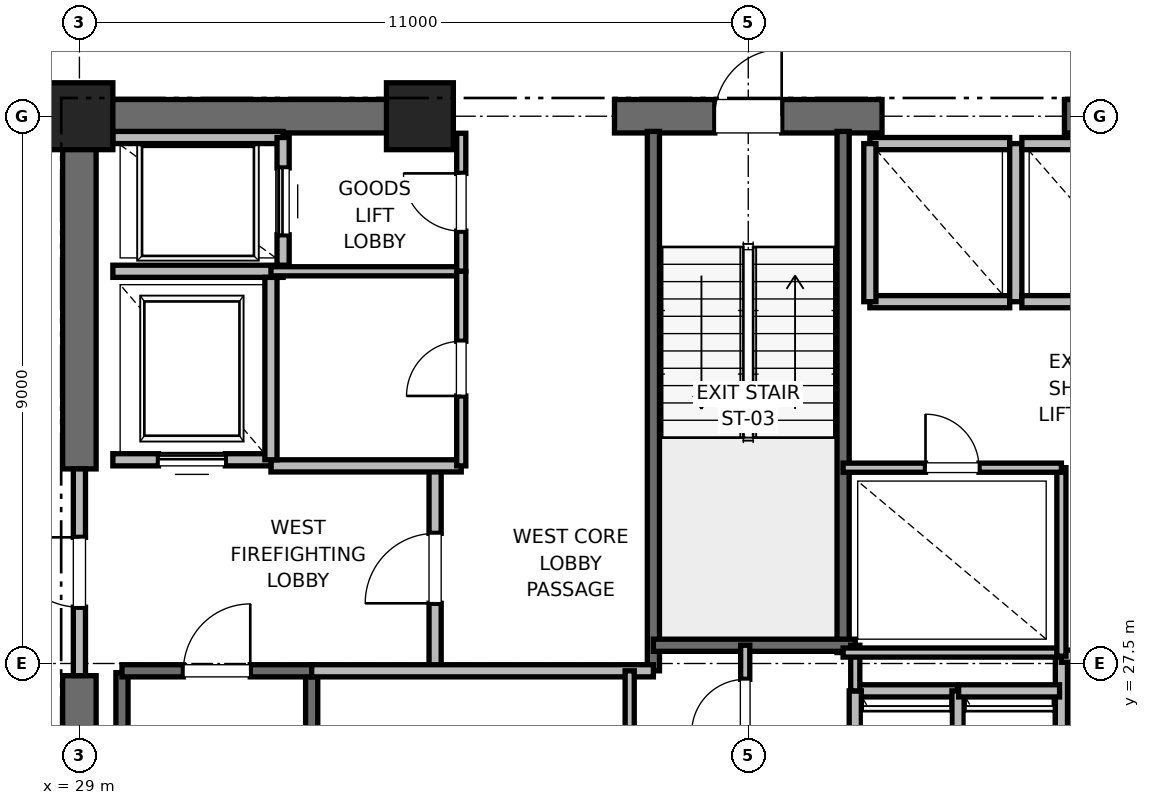
"""IFC4 building model, lengths in metres.
Left out: names, types, materials, properties, quantities, classifications, styles, units other than length and angle.
Written with IfcOpenShell. Run it as: python <this file> out.ifc"""

import sys

from ifc_helpers import new_model, si_unit, direction, frame, frame_2d, origin, origin_2d, place, context, subcontext, project, spatial, rectangle, extrude, element, fill, save


model = new_model("IFC4")
c1 = context("Model", 3, precision=1e-05, world=origin(), true_north=direction((0.0, 1.0)))
c2 = subcontext(c1, "Body", "Model", "MODEL_VIEW")
j1 = project(units=[si_unit("LENGTHUNIT", "METRE"), si_unit("PLANEANGLEUNIT", "RADIAN")], contexts=[c1])
p1 = place(None, origin())
s1 = spatial("IfcSite", under=j1, at=p1, CompositionType="ELEMENT")
p2 = place(p1, origin())
s2 = spatial("IfcBuilding", under=s1, at=p2, CompositionType="ELEMENT")
p3 = place(p2, frame((0.0, 0.0, 152.4)))
s3 = spatial("IfcBuildingStorey", under=s2, at=p3, CompositionType="ELEMENT", Elevation=152.4)
for number, where, z_axis, x_axis in (
    (1, (29.0, 36.5, 0.0), (0.0, 0.0, 1.0), (1.0, 0.0, 0.0)),
    (2, (34.6, 36.5, 0.0), (0.0, 0.0, 1.0), (1.0, 0.0, 0.0)),
):
    element("IfcColumn", number, at=place(p3, frame(where, z_axis=z_axis, x_axis=x_axis)), inside=s3, PredefinedType="PILASTER", context=c2, shape_type="SweptSolid", body=[
        extrude(rectangle(XDim=1.1, YDim=1.1, at=origin_2d()), origin(), (0.0, 0.0, 1.0), 4.0),
    ])
p4 = place(p3, frame((29.0, 36.5, 0.0), z_axis=(0.0, 0.0, 1.0), x_axis=(1.0, 0.0, 0.0)))
e3 = element("IfcWall", 3, at=p4, inside=s3, PredefinedType="SHEAR", context=c2, shape_type="SweptSolid", body=[
    extrude(rectangle(XDim=5.8, YDim=0.55, at=frame_2d((2.9, 0.0))), origin(), (0.0, 0.0, 1.0), 3.775),
])
p5 = place(p3, frame((37.8, 36.5, 0.0), z_axis=(0.0, 0.0, 1.0), x_axis=(1.0, 0.0, 0.0)))
e4 = element("IfcWall", 4, at=p5, inside=s3, PredefinedType="SHEAR", context=c2, shape_type="SweptSolid", body=[
    extrude(rectangle(XDim=4.4, YDim=0.55, at=frame_2d((2.2, 0.0))), origin(), (0.0, 0.0, 1.0), 3.775),
])
p6 = place(p5, frame((1.65, 0.0, 0.0)))
e5 = element("IfcOpeningElement", 5, at=p6, cuts=e4, PredefinedType="OPENING", context=c2, shape_type="SweptSolid", body=[
    extrude(rectangle(XDim=1.1, YDim=2.15, at=frame_2d((0.55, 1.075))), frame((0.0, 0.275, 0.0), z_axis=(0.0, -1.0, 0.0), x_axis=(1.0, 0.0, 0.0)), (0.0, 0.0, 1.0), 0.55),
])
p7 = place(p3, frame((45.2, 36.5, 0.0), z_axis=(0.0, 0.0, 1.0), x_axis=(1.0, 0.0, 0.0)))
e6 = element("IfcWall", 6, at=p7, inside=s3, PredefinedType="SHEAR", context=c2, shape_type="SweptSolid", body=[
    extrude(rectangle(XDim=5.8, YDim=0.55, at=frame_2d((2.9, 0.0))), origin(), (0.0, 0.0, 1.0), 3.775),
])
p8 = place(p3, frame((29.0, 18.5, 0.0), z_axis=(0.0, 0.0, 1.0), x_axis=(0.0, 1.0, 0.0)))
e7 = element("IfcWall", 7, at=p8, inside=s3, PredefinedType="SHEAR", context=c2, shape_type="SweptSolid", body=[
    extrude(rectangle(XDim=8.8, YDim=0.55, at=frame_2d((4.4, 0.0))), origin(), (0.0, 0.0, 1.0), 3.775),
])
p9 = place(p3, frame((29.0, 30.7, 0.0), z_axis=(0.0, 0.0, 1.0), x_axis=(0.0, 1.0, 0.0)))
e8 = element("IfcWall", 8, at=p9, inside=s3, PredefinedType="SHEAR", context=c2, shape_type="SweptSolid", body=[
    extrude(rectangle(XDim=5.8, YDim=0.55, at=frame_2d((2.9, 0.0))), origin(), (0.0, 0.0, 1.0), 3.775),
])
p10 = place(p3, frame((29.7, 19.2, 0.0), z_axis=(0.0, 0.0, 1.0), x_axis=(0.0, 1.0, 0.0)))
e9 = element("IfcWall", 9, at=p10, inside=s3, PredefinedType="SOLIDWALL", context=c2, shape_type="SweptSolid", body=[
    extrude(rectangle(XDim=8.15, YDim=0.2, at=frame_2d((4.075, 0.0))), origin(), (0.0, 0.0, 1.0), 3.775),
])
p11 = place(p3, frame((32.82, 18.6, 0.0), z_axis=(0.0, 0.0, 1.0), x_axis=(0.0, 1.0, 0.0)))
e10 = element("IfcWall", 10, at=p11, inside=s3, PredefinedType="SOLIDWALL", context=c2, shape_type="SweptSolid", body=[
    extrude(rectangle(XDim=8.78, YDim=0.2, at=frame_2d((4.39, 0.0))), origin(), (0.0, 0.0, 1.0), 3.775),
])
p12 = place(p3, frame((29.7, 27.38, 0.0), z_axis=(0.0, 0.0, 1.0), x_axis=(1.0, 0.0, 0.0)))
e11 = element("IfcWall", 11, at=p12, inside=s3, PredefinedType="SOLIDWALL", context=c2, shape_type="SweptSolid", body=[
    extrude(rectangle(XDim=3.12, YDim=0.2, at=frame_2d((1.56, 0.0))), origin(), (0.0, 0.0, 1.0), 3.775),
])
p13 = place(p12, frame((1.01, 0.0, 0.0)))
e12 = element("IfcOpeningElement", 12, at=p13, cuts=e11, PredefinedType="OPENING", context=c2, shape_type="SweptSolid", body=[
    extrude(rectangle(XDim=1.1, YDim=2.15, at=frame_2d((0.55, 1.075))), frame((0.0, 0.1, 0.0), z_axis=(0.0, -1.0, 0.0), x_axis=(1.0, 0.0, 0.0)), (0.0, 0.0, 1.0), 0.2),
])
p14 = place(p3, frame((38.44, 27.38, 0.0), z_axis=(0.0, 0.0, 1.0), x_axis=(0.0, 1.0, 0.0)))
e13 = element("IfcWall", 13, at=p14, inside=s3, PredefinedType="SOLIDWALL", context=c2, shape_type="SweptSolid", body=[
    extrude(rectangle(XDim=8.87, YDim=0.2, at=frame_2d((4.435, 0.0))), origin(), (0.0, 0.0, 1.0), 3.775),
])
p15 = place(p3, frame((41.56, 27.68, 0.0), z_axis=(0.0, 0.0, 1.0), x_axis=(0.0, 1.0, 0.0)))
e14 = element("IfcWall", 14, at=p15, inside=s3, PredefinedType="SOLIDWALL", context=c2, shape_type="SweptSolid", body=[
    extrude(rectangle(XDim=8.57, YDim=0.2, at=frame_2d((4.285, 0.0))), origin(), (0.0, 0.0, 1.0), 3.775),
])
p16 = place(p3, frame((38.44, 27.8, 0.0), z_axis=(0.0, 0.0, 1.0), x_axis=(1.0, 0.0, 0.0)))
e15 = element("IfcWall", 15, at=p16, inside=s3, PredefinedType="SOLIDWALL", context=c2, shape_type="SweptSolid", body=[
    extrude(rectangle(XDim=3.32, YDim=0.2, at=frame_2d((1.66, 0.0))), origin(), (0.0, 0.0, 1.0), 3.775),
])
p17 = place(p3, frame((34.85, 27.38, 0.0), z_axis=(0.0, 0.0, 1.0), x_axis=(0.0, 1.0, 0.0)))
e16 = element("IfcWall", 16, at=p17, inside=s3, PredefinedType="PARTITIONING", context=c2, shape_type="SweptSolid", body=[
    extrude(rectangle(XDim=3.37, YDim=0.2, at=frame_2d((1.685, 0.0))), origin(), (0.0, 0.0, 1.0), 3.775),
])
p18 = place(p17, frame((1.11, 0.0, 0.0)))
e17 = element("IfcOpeningElement", 17, at=p18, cuts=e16, PredefinedType="OPENING", context=c2, shape_type="SweptSolid", body=[
    extrude(rectangle(XDim=1.15, YDim=2.2, at=frame_2d((0.575, 1.1))), frame((0.0, 0.1, 0.0), z_axis=(0.0, -1.0, 0.0), x_axis=(1.0, 0.0, 0.0)), (0.0, 0.0, 1.0), 0.2),
])
p19 = place(p3, frame((29.0, 27.3, 0.0), z_axis=(0.0, 0.0, 1.0), x_axis=(0.0, 1.0, 0.0)))
e18 = element("IfcWall", 18, at=p19, inside=s3, PredefinedType="PARTITIONING", context=c2, shape_type="SweptSolid", body=[
    extrude(rectangle(XDim=3.4, YDim=0.2, at=frame_2d((1.7, 0.0))), origin(), (0.0, 0.0, 1.0), 2.755),
])
p20 = place(p19, frame((1.125, 0.0, 0.0)))
e19 = element("IfcOpeningElement", 19, at=p20, cuts=e18, PredefinedType="OPENING", context=c2, shape_type="SweptSolid", body=[
    extrude(rectangle(XDim=1.15, YDim=2.2, at=frame_2d((0.575, 1.1))), frame((0.0, 0.1, 0.0), z_axis=(0.0, -1.0, 0.0), x_axis=(1.0, 0.0, 0.0)), (0.0, 0.0, 1.0), 0.2),
])
p21 = place(p3, frame((32.82, 27.38, 0.0), z_axis=(0.0, 0.0, 1.0), x_axis=(1.0, 0.0, 0.0)))
e20 = element("IfcWall", 20, at=p21, inside=s3, PredefinedType="PARTITIONING", context=c2, shape_type="SweptSolid", body=[
    extrude(rectangle(XDim=5.62, YDim=0.2, at=frame_2d((2.81, 0.0))), origin(), (0.0, 0.0, 1.0), 3.775),
])
p22 = place(p3, frame((32.15, 30.75, 0.0), z_axis=(0.0, 0.0, 1.0), x_axis=(1.0, 0.0, 0.0)))
e21 = element("IfcWall", 21, at=p22, inside=s3, PredefinedType="PARTITIONING", context=c2, shape_type="SweptSolid", body=[
    extrude(rectangle(XDim=3.13, YDim=0.2, at=frame_2d((1.565, 0.0))), origin(), (0.0, 0.0, 1.0), 3.775),
])
p23 = place(p3, frame((45.15, 24.25, 0.0), z_axis=(0.0, 0.0, 1.0), x_axis=(0.0, 1.0, 0.0)))
e22 = element("IfcWall", 22, at=p23, inside=s3, PredefinedType="PARTITIONING", context=c2, shape_type="SweptSolid", body=[
    extrude(rectangle(XDim=3.37, YDim=0.2, at=frame_2d((1.685, 0.0))), origin(), (0.0, 0.0, 1.0), 3.775),
])
p24 = place(p3, frame((45.15, 27.62, 0.0), z_axis=(0.0, 0.0, 1.0), x_axis=(1.0, 0.0, 0.0)))
e23 = element("IfcWall", 23, at=p24, inside=s3, PredefinedType="PARTITIONING", context=c2, shape_type="SweptSolid", body=[
    extrude(rectangle(XDim=2.03, YDim=0.2, at=frame_2d((1.015, 0.0))), origin(), (0.0, 0.0, 1.0), 3.775),
])
p25 = place(p24, frame((0.44, 0.0, 0.0)))
e24 = element("IfcOpeningElement", 24, at=p25, cuts=e23, PredefinedType="OPENING", context=c2, shape_type="SweptSolid", body=[
    extrude(rectangle(XDim=1.15, YDim=2.2, at=frame_2d((0.575, 1.1))), frame((0.0, 0.1, 0.0), z_axis=(0.0, -1.0, 0.0), x_axis=(1.0, 0.0, 0.0)), (0.0, 0.0, 1.0), 0.2),
])
p26 = place(p3, frame((29.55, 30.85, 0.0), z_axis=(0.0, 0.0, 1.0), x_axis=(1.0, 0.0, 0.0)))
e25 = element("IfcWall", 25, at=p26, inside=s3, PredefinedType="SOLIDWALL", context=c2, shape_type="SweptSolid", body=[
    extrude(rectangle(XDim=2.6, YDim=0.2, at=frame_2d((1.3, 0.0))), origin(), (0.0, 0.0, 1.0), 2.755),
])
p27 = place(p26, frame((0.75, 0.0, 0.0)))
e26 = element("IfcOpeningElement", 26, at=p27, cuts=e25, PredefinedType="OPENING", context=c2, shape_type="SweptSolid", body=[
    extrude(rectangle(XDim=1.1, YDim=2.2, at=frame_2d((0.55, 1.1))), frame((0.0, 0.1, 0.0), z_axis=(0.0, -1.0, 0.0), x_axis=(1.0, 0.0, 0.0)), (0.0, 0.0, 1.0), 0.2),
])
p28 = place(p3, frame((29.55, 33.95, 0.0), z_axis=(0.0, 0.0, 1.0), x_axis=(1.0, 0.0, 0.0)))
e27 = element("IfcWall", 27, at=p28, inside=s3, PredefinedType="SOLIDWALL", context=c2, shape_type="SweptSolid", body=[
    extrude(rectangle(XDim=2.8, YDim=0.2, at=frame_2d((1.4, 0.0))), origin(), (0.0, 0.0, 1.0), 3.775),
])
p29 = place(p3, frame((32.15, 30.85, 0.0), z_axis=(0.0, 0.0, 1.0), x_axis=(0.0, 1.0, 0.0)))
e28 = element("IfcWall", 28, at=p29, inside=s3, PredefinedType="SOLIDWALL", context=c2, shape_type="SweptSolid", body=[
    extrude(rectangle(XDim=3.0, YDim=0.2, at=frame_2d((1.5, 0.0))), origin(), (0.0, 0.0, 1.0), 3.775),
])
p30 = place(p3, frame((32.35, 36.15, 0.0), z_axis=(0.0, 0.0, 1.0), x_axis=(-1.0, 0.0, 0.0)))
e29 = element("IfcWall", 29, at=p30, inside=s3, PredefinedType="SOLIDWALL", context=c2, shape_type="SweptSolid", body=[
    extrude(rectangle(XDim=2.8, YDim=0.2, at=frame_2d((1.4, 0.0))), origin(), (0.0, 0.0, 1.0), 2.985),
])
p31 = place(p3, frame((32.35, 34.05, 0.0), z_axis=(0.0, 0.0, 1.0), x_axis=(0.0, 1.0, 0.0)))
e30 = element("IfcWall", 30, at=p31, inside=s3, PredefinedType="SOLIDWALL", context=c2, shape_type="SweptSolid", body=[
    extrude(rectangle(XDim=2.1, YDim=0.2, at=frame_2d((1.05, 0.0))), origin(), (0.0, 0.0, 1.0), 3.775),
])
p32 = place(p31, frame((0.5, 0.0, 0.0)))
e31 = element("IfcOpeningElement", 31, at=p32, cuts=e30, PredefinedType="OPENING", context=c2, shape_type="SweptSolid", body=[
    extrude(rectangle(XDim=1.1, YDim=2.2, at=frame_2d((0.55, 1.1))), frame((0.0, 0.1, 0.0), z_axis=(0.0, -1.0, 0.0), x_axis=(1.0, 0.0, 0.0)), (0.0, 0.0, 1.0), 0.2),
])
p33 = place(p3, frame((43.44, 27.05, 0.0), z_axis=(0.0, 0.0, 1.0), x_axis=(-1.0, 0.0, 0.0)))
e32 = element("IfcWall", 32, at=p33, inside=s3, PredefinedType="SOLIDWALL", context=c2, shape_type="SweptSolid", body=[
    extrude(rectangle(XDim=1.68, YDim=0.2, at=frame_2d((0.84, 0.0))), origin(), (0.0, 0.0, 1.0), 3.775),
])
for number, where, z_axis, x_axis in (
    (33, (41.76, 27.05, 0.0), (0.0, 0.0, 1.0), (0.0, -1.0, 0.0)),
    (34, (43.45, 24.45, 0.0), (0.0, 0.0, 1.0), (0.0, 1.0, 0.0)),
):
    element("IfcWall", number, at=place(p3, frame(where, z_axis=z_axis, x_axis=x_axis)), inside=s3, PredefinedType="SOLIDWALL", context=c2, shape_type="SweptSolid", body=[
        extrude(rectangle(XDim=2.6, YDim=0.2, at=frame_2d((1.3, 0.0))), origin(), (0.0, 0.0, 1.0), 3.775),
    ])
p34 = place(p3, frame((45.12, 27.05, 0.0), z_axis=(0.0, 0.0, 1.0), x_axis=(-1.0, 0.0, 0.0)))
e35 = element("IfcWall", 35, at=p34, inside=s3, PredefinedType="SOLIDWALL", context=c2, shape_type="SweptSolid", body=[
    extrude(rectangle(XDim=1.66, YDim=0.2, at=frame_2d((0.83, 0.0))), origin(), (0.0, 0.0, 1.0), 3.775),
])
p35 = place(p3, frame((42.0, 33.45, 0.0), z_axis=(0.0, 0.0, 1.0), x_axis=(1.0, 0.0, 0.0)))
e36 = element("IfcWall", 36, at=p35, inside=s3, PredefinedType="SOLIDWALL", context=c2, shape_type="SweptSolid", body=[
    extrude(rectangle(XDim=2.3, YDim=0.2, at=frame_2d((1.15, 0.0))), origin(), (0.0, 0.0, 1.0), 3.775),
])
p36 = place(p3, frame((44.3, 36.05, 0.0), z_axis=(0.0, 0.0, 1.0), x_axis=(-1.0, 0.0, 0.0)))
e37 = element("IfcWall", 37, at=p36, inside=s3, PredefinedType="SOLIDWALL", context=c2, shape_type="SweptSolid", body=[
    extrude(rectangle(XDim=2.3, YDim=0.2, at=frame_2d((1.15, 0.0))), origin(), (0.0, 0.0, 1.0), 2.755),
])
for number, where, z_axis, x_axis in (
    (38, (42.0, 36.05, 0.0), (0.0, 0.0, 1.0), (0.0, -1.0, 0.0)),
    (39, (44.4, 33.45, 0.0), (0.0, 0.0, 1.0), (0.0, 1.0, 0.0)),
):
    element("IfcWall", number, at=place(p3, frame(where, z_axis=z_axis, x_axis=x_axis)), inside=s3, PredefinedType="SOLIDWALL", context=c2, shape_type="SweptSolid", body=[
        extrude(rectangle(XDim=2.6, YDim=0.2, at=frame_2d((1.3, 0.0))), origin(), (0.0, 0.0, 1.0), 2.755),
    ])
p37 = place(p3, frame((44.5, 33.45, 0.0), z_axis=(0.0, 0.0, 1.0), x_axis=(1.0, 0.0, 0.0)))
e40 = element("IfcWall", 40, at=p37, inside=s3, PredefinedType="SOLIDWALL", context=c2, shape_type="SweptSolid", body=[
    extrude(rectangle(XDim=2.3, YDim=0.2, at=frame_2d((1.15, 0.0))), origin(), (0.0, 0.0, 1.0), 3.775),
])
p38 = place(p3, frame((46.8, 36.05, 0.0), z_axis=(0.0, 0.0, 1.0), x_axis=(-1.0, 0.0, 0.0)))
e41 = element("IfcWall", 41, at=p38, inside=s3, PredefinedType="SOLIDWALL", context=c2, shape_type="SweptSolid", body=[
    extrude(rectangle(XDim=2.3, YDim=0.2, at=frame_2d((1.15, 0.0))), origin(), (0.0, 0.0, 1.0), 2.755),
])
p39 = place(p3, frame((41.76, 27.05, 0.0), z_axis=(0.0, 0.0, 1.0), x_axis=(0.0, 1.0, 0.0)))
e42 = element("IfcWall", 42, at=p39, inside=s3, PredefinedType="PARTITIONING", context=c2, shape_type="SweptSolid", body=[
    extrude(rectangle(XDim=0.75, YDim=0.15, at=frame_2d((0.375, 0.0))), origin(), (0.0, 0.0, 1.0), 2.85),
])
p40 = place(p3, frame((39.95, 25.8, 0.0), z_axis=(0.0, 0.0, 1.0), x_axis=(0.0, 1.0, 0.0)))
e43 = element("IfcWall", 43, at=p40, inside=s3, PredefinedType="PARTITIONING", context=c2, shape_type="SweptSolid", body=[
    extrude(rectangle(XDim=2.0, YDim=0.15, at=frame_2d((1.0, 0.0))), origin(), (0.0, 0.0, 1.0), 2.85),
])
p41 = place(p40, frame((0.56, 0.0, 0.0)))
e44 = element("IfcOpeningElement", 44, at=p41, cuts=e43, PredefinedType="OPENING", context=c2, shape_type="SweptSolid", body=[
    extrude(rectangle(XDim=0.88, YDim=2.1, at=frame_2d((0.44, 1.05))), frame((0.0, 0.075, 0.0), z_axis=(0.0, -1.0, 0.0), x_axis=(1.0, 0.0, 0.0)), (0.0, 0.0, 1.0), 0.15),
])
p42 = place(p3, frame((32.15, 33.95, 0.0), z_axis=(0.0, 0.0, 1.0), x_axis=(1.0, 0.0, 0.0)))
e45 = element("IfcWall", 45, at=p42, inside=s3, PredefinedType="PARTITIONING", context=c2, shape_type="SweptSolid", body=[
    extrude(rectangle(XDim=3.13, YDim=0.15, at=frame_2d((1.565, 0.0))), origin(), (0.0, 0.0, 1.0), 2.85),
])
p43 = place(p3, frame((35.28, 33.95, 0.0), z_axis=(0.0, 0.0, 1.0), x_axis=(0.0, 1.0, 0.0)))
e46 = element("IfcWall", 46, at=p43, inside=s3, PredefinedType="PARTITIONING", context=c2, shape_type="SweptSolid", body=[
    extrude(rectangle(XDim=2.27, YDim=0.15, at=frame_2d((1.135, 0.0))), origin(), (0.0, 0.0, 1.0), 2.755),
])
p44 = place(p43, frame((0.66, 0.0, 0.0)))
e47 = element("IfcOpeningElement", 47, at=p44, cuts=e46, PredefinedType="OPENING", context=c2, shape_type="SweptSolid", body=[
    extrude(rectangle(XDim=0.95, YDim=2.15, at=frame_2d((0.475, 1.075))), frame((0.0, 0.075, 0.0), z_axis=(0.0, -1.0, 0.0), x_axis=(1.0, 0.0, 0.0)), (0.0, 0.0, 1.0), 0.15),
])
p45 = place(p3, frame((35.28, 30.75, 0.0), z_axis=(0.0, 0.0, 1.0), x_axis=(0.0, 1.0, 0.0)))
e48 = element("IfcWall", 48, at=p45, inside=s3, PredefinedType="PARTITIONING", context=c2, shape_type="SweptSolid", body=[
    extrude(rectangle(XDim=3.2, YDim=0.15, at=frame_2d((1.6, 0.0))), origin(), (0.0, 0.0, 1.0), 2.85),
])
p46 = place(p45, frame((1.15, 0.0, 0.0)))
e49 = element("IfcOpeningElement", 49, at=p46, cuts=e48, PredefinedType="OPENING", context=c2, shape_type="SweptSolid", body=[
    extrude(rectangle(XDim=0.9, YDim=2.1, at=frame_2d((0.45, 1.05))), frame((0.0, 0.075, 0.0), z_axis=(0.0, -1.0, 0.0), x_axis=(1.0, 0.0, 0.0)), (0.0, 0.0, 1.0), 0.15),
])
p47 = place(p3, frame((38.05, 18.6, 0.0), z_axis=(0.0, 0.0, 1.0), x_axis=(0.0, 1.0, 0.0)))
e50 = element("IfcWall", 50, at=p47, inside=s3, PredefinedType="PARTITIONING", context=c2, shape_type="SweptSolid", body=[
    extrude(rectangle(XDim=8.78, YDim=0.15, at=frame_2d((4.39, 0.0))), origin(), (0.0, 0.0, 1.0), 2.755),
])
p48 = place(p47, frame((3.89, 0.0, 0.0)))
e51 = element("IfcOpeningElement", 51, at=p48, cuts=e50, PredefinedType="OPENING", context=c2, shape_type="SweptSolid", body=[
    extrude(rectangle(XDim=1.0, YDim=2.15, at=frame_2d((0.5, 1.075))), frame((0.0, 0.075, 0.0), z_axis=(0.0, -1.0, 0.0), x_axis=(1.0, 0.0, 0.0)), (0.0, 0.0, 1.0), 0.15),
])
p49 = place(p3, frame((41.56, 27.68, 0.0), z_axis=(0.0, 0.0, 1.0), x_axis=(1.0, 0.0, 0.0)))
e52 = element("IfcWall", 52, at=p49, inside=s3, PredefinedType="PARTITIONING", context=c2, shape_type="SweptSolid", body=[
    extrude(rectangle(XDim=3.59, YDim=0.15, at=frame_2d((1.795, 0.0))), origin(), (0.0, 0.0, 1.0), 2.85),
])
p50 = place(p3, frame((45.15, 27.62, 0.0), z_axis=(0.0, 0.0, 1.0), x_axis=(0.0, 1.0, 0.0)))
e53 = element("IfcWall", 53, at=p50, inside=s3, PredefinedType="PARTITIONING", context=c2, shape_type="SweptSolid", body=[
    extrude(rectangle(XDim=3.1, YDim=0.15, at=frame_2d((1.55, 0.0))), origin(), (0.0, 0.0, 1.0), 2.85),
])
p51 = place(p3, frame((41.56, 30.72, 0.0), z_axis=(0.0, 0.0, 1.0), x_axis=(1.0, 0.0, 0.0)))
e54 = element("IfcWall", 54, at=p51, inside=s3, PredefinedType="PARTITIONING", context=c2, shape_type="SweptSolid", body=[
    extrude(rectangle(XDim=3.59, YDim=0.15, at=frame_2d((1.795, 0.0))), origin(), (0.0, 0.0, 1.0), 2.85),
])
p52 = place(p51, frame((1.355, 0.0, 0.0)))
e55 = element("IfcOpeningElement", 55, at=p52, cuts=e54, PredefinedType="OPENING", context=c2, shape_type="SweptSolid", body=[
    extrude(rectangle(XDim=0.88, YDim=2.1, at=frame_2d((0.44, 1.05))), frame((0.0, 0.075, 0.0), z_axis=(0.0, -1.0, 0.0), x_axis=(1.0, 0.0, 0.0)), (0.0, 0.0, 1.0), 0.15),
])
p53 = place(p13, origin())
e56 = element("IfcDoor", 56, at=p53, inside=s3, OperationType="SINGLE_SWING_RIGHT", PredefinedType="DOOR", context=c2, shape_type="SweptSolid", body=[
    extrude(rectangle(XDim=1.1, YDim=2.15, at=frame_2d((0.55, 1.075))), frame((0.0, 0.025, 0.0), z_axis=(0.0, -1.0, 0.0), x_axis=(1.0, 0.0, 0.0)), (0.0, 0.0, 1.0), 0.05),
])
fill(e12, e56)
p54 = place(p6, origin())
e57 = element("IfcDoor", 57, at=p54, inside=s3, OperationType="SINGLE_SWING_RIGHT", PredefinedType="DOOR", context=c2, shape_type="SweptSolid", body=[
    extrude(rectangle(XDim=1.1, YDim=2.15, at=frame_2d((0.55, 1.075))), frame((0.0, 0.025, 0.0), z_axis=(0.0, -1.0, 0.0), x_axis=(1.0, 0.0, 0.0)), (0.0, 0.0, 1.0), 0.05),
])
fill(e5, e57)
p55 = place(p18, origin())
e58 = element("IfcDoor", 58, at=p55, inside=s3, OperationType="SINGLE_SWING_LEFT", PredefinedType="DOOR", context=c2, shape_type="SweptSolid", body=[
    extrude(rectangle(XDim=1.15, YDim=2.2, at=frame_2d((0.575, 1.1))), frame((0.0, 0.025, 0.0), z_axis=(0.0, -1.0, 0.0), x_axis=(1.0, 0.0, 0.0)), (0.0, 0.0, 1.0), 0.05),
])
fill(e17, e58)
p56 = place(p20, origin())
e59 = element("IfcDoor", 59, at=p56, inside=s3, OperationType="SINGLE_SWING_RIGHT", PredefinedType="DOOR", context=c2, shape_type="SweptSolid", body=[
    extrude(rectangle(XDim=1.15, YDim=2.2, at=frame_2d((0.575, 1.1))), frame((0.0, 0.025, 0.0), z_axis=(0.0, -1.0, 0.0), x_axis=(1.0, 0.0, 0.0)), (0.0, 0.0, 1.0), 0.05),
])
fill(e19, e59)
p57 = place(p27, origin())
e60 = element("IfcDoor", 60, at=p57, inside=s3, OperationType="SLIDING_TO_RIGHT", PredefinedType="DOOR", context=c2, shape_type="SweptSolid", body=[
    extrude(rectangle(XDim=1.1, YDim=2.2, at=frame_2d((0.55, 1.1))), frame((0.0, 0.025, 0.0), z_axis=(0.0, -1.0, 0.0), x_axis=(1.0, 0.0, 0.0)), (0.0, 0.0, 1.0), 0.05),
])
fill(e26, e60)
p58 = place(p32, origin())
e61 = element("IfcDoor", 61, at=p58, inside=s3, OperationType="SLIDING_TO_RIGHT", PredefinedType="DOOR", context=c2, shape_type="SweptSolid", body=[
    extrude(rectangle(XDim=1.1, YDim=2.2, at=frame_2d((0.55, 1.1))), frame((0.0, 0.025, 0.0), z_axis=(0.0, -1.0, 0.0), x_axis=(1.0, 0.0, 0.0)), (0.0, 0.0, 1.0), 0.05),
])
fill(e31, e61)
p59 = place(p41, origin())
e62 = element("IfcDoor", 62, at=p59, inside=s3, OperationType="SINGLE_SWING_LEFT", PredefinedType="DOOR", context=c2, shape_type="SweptSolid", body=[
    extrude(rectangle(XDim=0.88, YDim=2.1, at=frame_2d((0.44, 1.05))), frame((0.0, 0.025, 0.0), z_axis=(0.0, -1.0, 0.0), x_axis=(1.0, 0.0, 0.0)), (0.0, 0.0, 1.0), 0.05),
])
fill(e44, e62)
p60 = place(p44, origin())
e63 = element("IfcDoor", 63, at=p60, inside=s3, OperationType="SINGLE_SWING_RIGHT", PredefinedType="DOOR", context=c2, shape_type="SweptSolid", body=[
    extrude(rectangle(XDim=0.95, YDim=2.15, at=frame_2d((0.475, 1.075))), frame((0.0, 0.025, 0.0), z_axis=(0.0, -1.0, 0.0), x_axis=(1.0, 0.0, 0.0)), (0.0, 0.0, 1.0), 0.05),
])
fill(e47, e63)
p61 = place(p46, origin())
e64 = element("IfcDoor", 64, at=p61, inside=s3, OperationType="SINGLE_SWING_LEFT", PredefinedType="DOOR", context=c2, shape_type="SweptSolid", body=[
    extrude(rectangle(XDim=0.9, YDim=2.1, at=frame_2d((0.45, 1.05))), frame((0.0, 0.025, 0.0), z_axis=(0.0, -1.0, 0.0), x_axis=(1.0, 0.0, 0.0)), (0.0, 0.0, 1.0), 0.05),
])
fill(e49, e64)
p62 = place(p52, origin())
e65 = element("IfcDoor", 65, at=p62, inside=s3, OperationType="SINGLE_SWING_LEFT", PredefinedType="DOOR", context=c2, shape_type="SweptSolid", body=[
    extrude(rectangle(XDim=0.88, YDim=2.1, at=frame_2d((0.44, 1.05))), frame((0.0, 0.025, 0.0), z_axis=(0.0, -1.0, 0.0), x_axis=(1.0, 0.0, 0.0)), (0.0, 0.0, 1.0), 0.05),
])
fill(e55, e65)
save(model, sys.argv[1])
